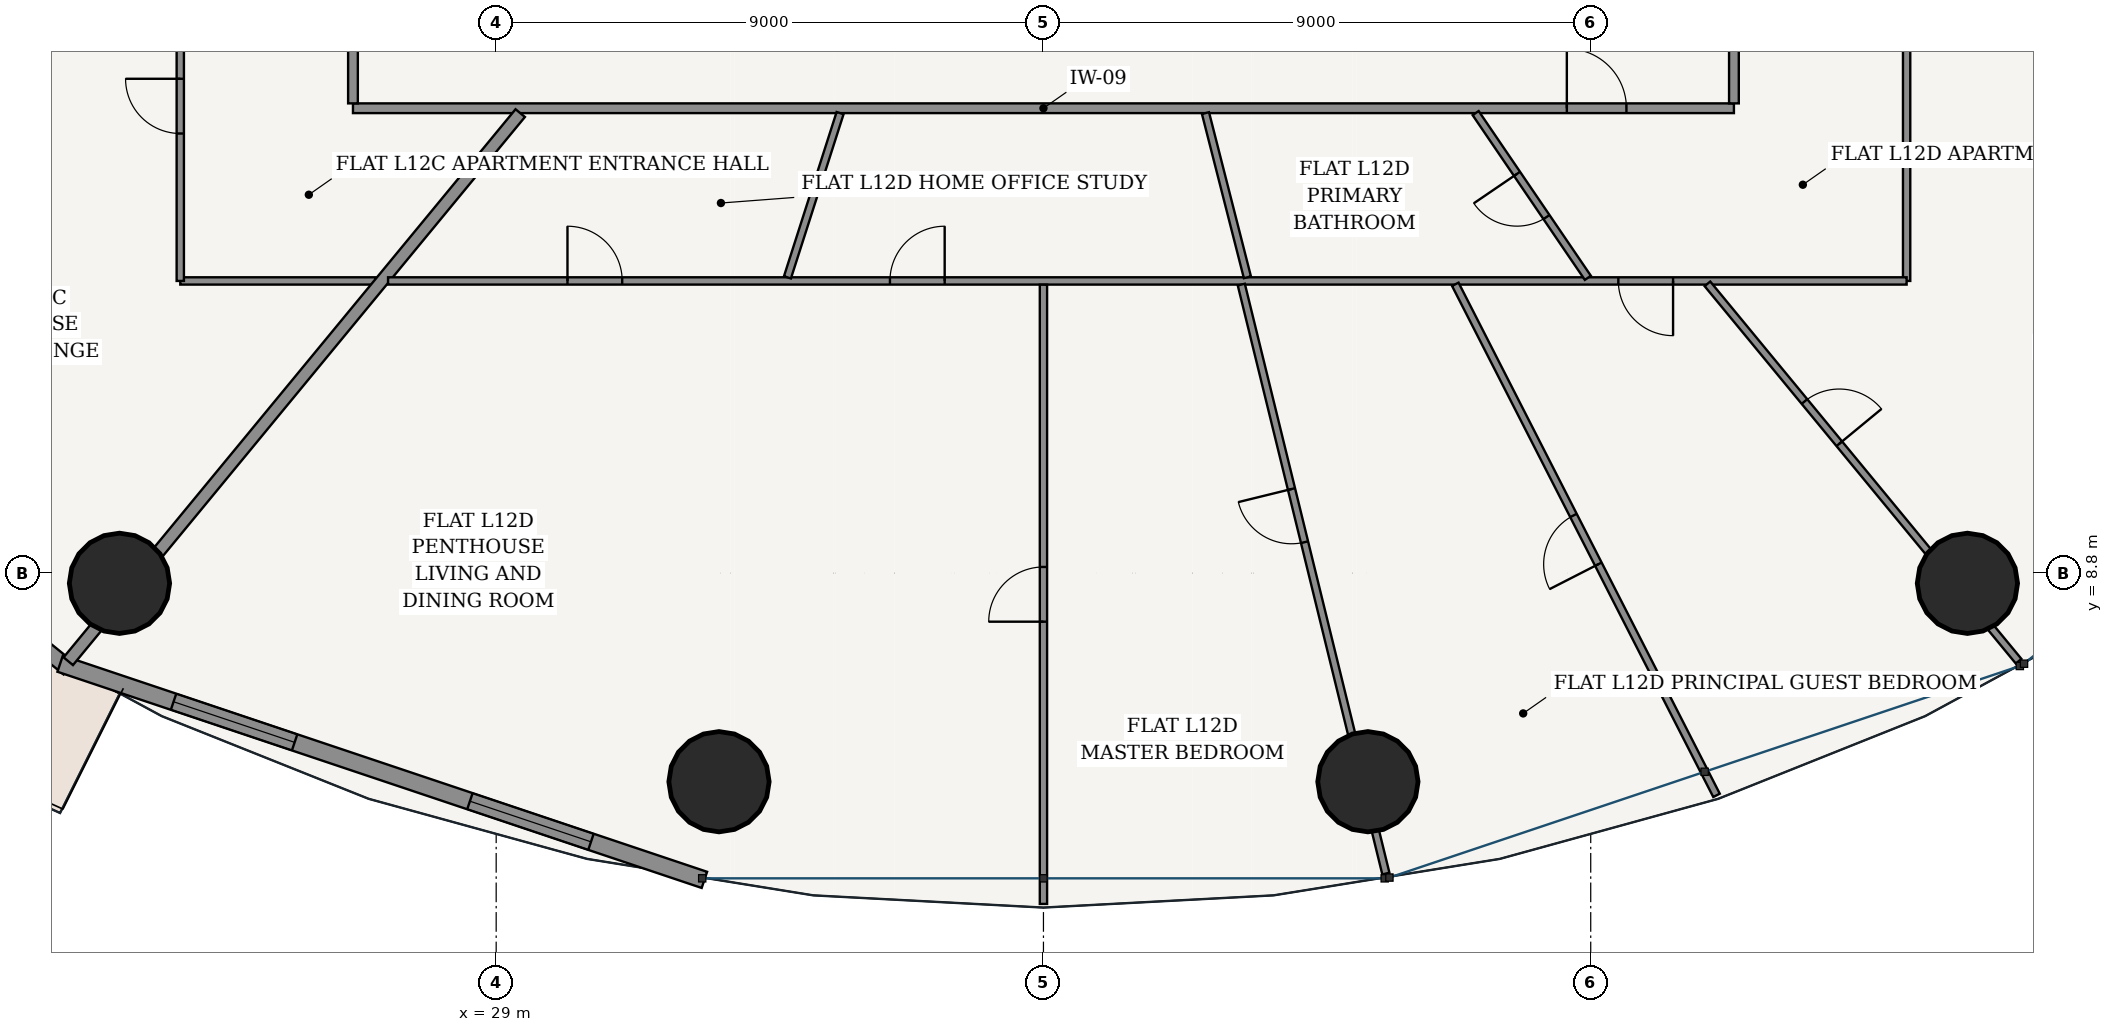
"""IFC4 building model, lengths in metres.
Left out: names, types, materials, properties, quantities, classifications, styles, units other than length and angle.
Written with IfcOpenShell. Run it as: python <this file> out.ifc"""

import sys

from ifc_helpers import new_model, si_unit, direction, frame, frame_2d, origin, origin_2d, place, context, subcontext, project, spatial, rectangle, hollow_circle, extrude, source, transform, mapped, element, fill, save


model = new_model("IFC4")
c1 = context("Model", 3, precision=1e-05, world=origin(), true_north=direction((-0.2419218956, 0.970295726276)))
c2 = subcontext(c1, "Body", "Model", "MODEL_VIEW")
j1 = project(units=[si_unit("LENGTHUNIT", "METRE"), si_unit("PLANEANGLEUNIT", "RADIAN")], contexts=[c1])
p1 = place(None, origin())
s1 = spatial("IfcSite", under=j1, at=p1, CompositionType="ELEMENT")
p2 = place(p1, origin())
s2 = spatial("IfcBuilding", under=s1, at=p2, CompositionType="ELEMENT")
p3 = place(p2, frame((0.0, 0.0, 49.2)))
s3 = spatial("IfcBuildingStorey", under=s2, at=p3, CompositionType="ELEMENT", Elevation=49.2)
for number, where, z_axis, x_axis in (
    (1, (22.805, 8.632, 0.0), (0.0, 0.0, 1.0), (1.0, 0.0, 0.0)),
    (2, (32.664, 5.37, 0.0), (0.0, 0.0, 1.0), (1.0, 0.0, 0.0)),
    (3, (43.336, 5.37, 0.0), (0.0, 0.0, 1.0), (1.0, 0.0, 0.0)),
    (4, (53.195, 8.632, 0.0), (0.0, 0.0, 1.0), (1.0, 0.0, 0.0)),
):
    element("IfcColumn", number, at=place(p3, frame(where, z_axis=z_axis, x_axis=x_axis)), inside=s3, PredefinedType="COLUMN", context=c2, shape_type="SweptSolid", body=[
        extrude(hollow_circle(Radius=0.825, WallThickness=0.05, at=origin_2d()), origin(), (0.0, 0.0, 1.0), 3.6),
    ])
p4 = place(p3, frame((13.85, 13.811, 0.0), z_axis=(0.0, 0.0, 1.0), x_axis=(0.777016782851, -0.629479879875, 0.0)))
e5 = element("IfcWall", 5, at=p4, inside=s3, PredefinedType="SOLIDWALL", context=c2, shape_type="SweptSolid", body=[
    extrude(rectangle(XDim=10.447, YDim=0.26, at=frame_2d((5.223, 0.0))), origin(), (0.0, 0.0, 1.0), 3.32),
])
p5 = place(p4, frame((4.548, 0.0, 0.0)))
e6 = element("IfcOpeningElement", 6, at=p5, cuts=e5, PredefinedType="OPENING", context=c2, shape_type="SweptSolid", body=[
    extrude(rectangle(XDim=1.35, YDim=2.2, at=frame_2d((0.675, 1.1))), frame((0.0, 0.14, 0.0), z_axis=(0.0, -1.0, 0.0), x_axis=(1.0, 0.0, 0.0)), (0.0, 0.0, 1.0), 0.28),
])
p6 = place(p3, frame((21.829, 7.311, 0.0), z_axis=(0.0, 0.0, 1.0), x_axis=(0.948047847546, -0.31812777113, 0.0)))
e7 = element("IfcWall", 7, at=p6, inside=s3, PredefinedType="SOLIDWALL", context=c2, shape_type="SweptSolid", body=[
    extrude(rectangle(XDim=11.175, YDim=0.28, at=frame_2d((5.588, 0.0))), origin(), (0.0, 0.0, 1.0), 3.32),
])
p7 = place(p6, frame((1.967, 0.0, 0.85)))
e8 = element("IfcOpeningElement", 8, at=p7, cuts=e7, PredefinedType="OPENING", context=c2, shape_type="SweptSolid", body=[
    extrude(rectangle(XDim=2.1, YDim=1.95, at=frame_2d((1.05, 0.975))), frame((0.0, 0.15, 0.0), z_axis=(0.0, -1.0, 0.0), x_axis=(1.0, 0.0, 0.0)), (0.0, 0.0, 1.0), 0.3),
])
p8 = place(p6, frame((7.108, 0.0, 0.85)))
e9 = element("IfcOpeningElement", 9, at=p8, cuts=e7, PredefinedType="OPENING", context=c2, shape_type="SweptSolid", body=[
    extrude(rectangle(XDim=2.1, YDim=1.95, at=frame_2d((1.05, 0.975))), frame((0.0, 0.15, 0.0), z_axis=(0.0, -1.0, 0.0), x_axis=(1.0, 0.0, 0.0)), (0.0, 0.0, 1.0), 0.3),
])
p9 = place(p3, frame((26.645, 16.445, 0.0), z_axis=(0.0, 0.0, 1.0), x_axis=(1.0, 0.0, 0.0)))
e10 = element("IfcWall", 10, at=p9, inside=s3, PredefinedType="PARTITIONING", context=c2, shape_type="SweptSolid", body=[
    extrude(rectangle(XDim=22.71, YDim=0.16, at=frame_2d((11.355, 0.0))), origin(), (0.0, 0.0, 1.0), 2.688),
])
p10 = place(p9, frame((19.962, 0.0, 0.0)))
e11 = element("IfcOpeningElement", 11, at=p10, cuts=e10, PredefinedType="OPENING", context=c2, shape_type="SweptSolid", body=[
    extrude(rectangle(XDim=0.98, YDim=2.2, at=frame_2d((0.49, 1.1))), frame((0.0, 0.09, 0.0), z_axis=(0.0, -1.0, 0.0), x_axis=(1.0, 0.0, 0.0)), (0.0, 0.0, 1.0), 0.18),
])
p11 = place(p3, frame((26.645, 16.525, 0.0), z_axis=(0.0, 0.0, 1.0), x_axis=(0.0, 1.0, 0.0)))
e12 = element("IfcWall", 12, at=p11, inside=s3, PredefinedType="PARTITIONING", context=c2, shape_type="SweptSolid", body=[
    extrude(rectangle(XDim=20.55, YDim=0.16, at=frame_2d((10.275, 0.0))), origin(), (0.0, 0.0, 1.0), 2.688),
])
p12 = place(p11, frame((2.224, 0.0, 0.0)))
e13 = element("IfcOpeningElement", 13, at=p12, cuts=e12, PredefinedType="OPENING", context=c2, shape_type="SweptSolid", body=[
    extrude(rectangle(XDim=0.98, YDim=2.2, at=frame_2d((0.49, 1.1))), frame((0.0, 0.09, 0.0), z_axis=(0.0, -1.0, 0.0), x_axis=(1.0, 0.0, 0.0)), (0.0, 0.0, 1.0), 0.18),
])
p13 = place(p3, frame((49.355, 16.525, 0.0), z_axis=(0.0, 0.0, 1.0), x_axis=(0.0, 1.0, 0.0)))
e14 = element("IfcWall", 14, at=p13, inside=s3, PredefinedType="PARTITIONING", context=c2, shape_type="SweptSolid", body=[
    extrude(rectangle(XDim=20.55, YDim=0.16, at=frame_2d((10.275, 0.0))), origin(), (0.0, 0.0, 1.0), 2.688),
])
p14 = place(p3, frame((49.435, 20.608, 0.0), z_axis=(0.0, 0.0, 1.0), x_axis=(0.879369737803, -0.476139542819, 0.0)))
e15 = element("IfcWall", 15, at=p14, inside=s3, PredefinedType="PARTITIONING", context=c2, shape_type="SweptSolid", body=[
    extrude(rectangle(XDim=14.295, YDim=0.2, at=frame_2d((7.147, 0.0))), origin(), (0.0, 0.0, 1.0), 2.688),
])
p15 = place(p3, frame((27.018, 13.605, 0.0), z_axis=(0.0, 0.0, 1.0), x_axis=(-1.0, 0.0, 0.0)))
e16 = element("IfcWall", 16, at=p15, inside=s3, PredefinedType="PARTITIONING", context=c2, shape_type="SweptSolid", body=[
    extrude(rectangle(XDim=3.213, YDim=0.12, at=frame_2d((1.606, 0.0))), origin(), (0.0, 0.0, 1.0), 2.688),
])
p16 = place(p3, frame((23.805, 13.605, 0.0), z_axis=(0.0, 0.0, 1.0), x_axis=(0.0, 1.0, 0.0)))
e17 = element("IfcWall", 17, at=p16, inside=s3, PredefinedType="PARTITIONING", context=c2, shape_type="SweptSolid", body=[
    extrude(rectangle(XDim=20.779, YDim=0.12, at=frame_2d((10.39, 0.0))), origin(), (0.0, 0.0, 1.0), 2.688),
])
p17 = place(p16, frame((2.425, 0.0, 0.0)))
e18 = element("IfcOpeningElement", 18, at=p17, cuts=e17, PredefinedType="OPENING", context=c2, shape_type="SweptSolid", body=[
    extrude(rectangle(XDim=0.9, YDim=2.15, at=frame_2d((0.45, 1.075))), frame((0.0, 0.07, 0.0), z_axis=(0.0, -1.0, 0.0), x_axis=(1.0, 0.0, 0.0)), (0.0, 0.0, 1.0), 0.14),
])
p18 = place(p16, frame((14.199, 0.0, 0.0)))
e19 = element("IfcOpeningElement", 19, at=p18, cuts=e17, PredefinedType="OPENING", context=c2, shape_type="SweptSolid", body=[
    extrude(rectangle(XDim=0.9, YDim=2.15, at=frame_2d((0.45, 1.075))), frame((0.0, 0.07, 0.0), z_axis=(0.0, -1.0, 0.0), x_axis=(1.0, 0.0, 0.0)), (0.0, 0.0, 1.0), 0.14),
])
p19 = place(p16, frame((17.908, 0.0, 0.0)))
e20 = element("IfcOpeningElement", 20, at=p19, cuts=e17, PredefinedType="OPENING", context=c2, shape_type="SweptSolid", body=[
    extrude(rectangle(XDim=0.9, YDim=2.15, at=frame_2d((0.45, 1.075))), frame((0.0, 0.07, 0.0), z_axis=(0.0, -1.0, 0.0), x_axis=(1.0, 0.0, 0.0)), (0.0, 0.0, 1.0), 0.14),
])
p20 = place(p3, frame((23.75, 19.084, 0.0), z_axis=(0.0, 0.0, 1.0), x_axis=(-0.879370672984, -0.476137815654, 0.0)))
e21 = element("IfcWall", 21, at=p20, inside=s3, PredefinedType="PARTITIONING", context=c2, shape_type="SweptSolid", body=[
    extrude(rectangle(XDim=11.094, YDim=0.12, at=frame_2d((5.547, 0.0))), origin(), (0.0, 0.0, 1.0), 2.688),
])
p21 = place(p20, frame((4.034, 0.0, 0.0)))
e22 = element("IfcOpeningElement", 22, at=p21, cuts=e21, PredefinedType="OPENING", context=c2, shape_type="SweptSolid", body=[
    extrude(rectangle(XDim=0.9, YDim=2.15, at=frame_2d((0.45, 1.075))), frame((0.0, 0.07, 0.0), z_axis=(0.0, -1.0, 0.0), x_axis=(1.0, 0.0, 0.0)), (0.0, 0.0, 1.0), 0.14),
])
p22 = place(p3, frame((29.396, 16.365, 0.0), z_axis=(0.0, 0.0, 1.0), x_axis=(-0.636186165667, -0.771535587393, 0.0)))
e23 = element("IfcWall", 23, at=p22, inside=s3, PredefinedType="PARTITIONING", context=c2, shape_type="SweptSolid", body=[
    extrude(rectangle(XDim=11.683, YDim=0.2, at=frame_2d((5.842, 0.0))), origin(), (0.0, 0.0, 1.0), 2.688),
])
p23 = place(p3, frame((52.195, 19.012, 0.0), z_axis=(0.0, 0.0, 1.0), x_axis=(0.0, -1.0, 0.0)))
e24 = element("IfcWall", 24, at=p23, inside=s3, PredefinedType="PARTITIONING", context=c2, shape_type="SweptSolid", body=[
    extrude(rectangle(XDim=5.407, YDim=0.12, at=frame_2d((2.704, 0.0))), origin(), (0.0, 0.0, 1.0), 2.999),
])
p24 = place(p3, frame((52.195, 13.605, 0.0), z_axis=(0.0, 0.0, 1.0), x_axis=(-1.0, 0.0, 0.0)))
e25 = element("IfcWall", 25, at=p24, inside=s3, PredefinedType="PARTITIONING", context=c2, shape_type="SweptSolid", body=[
    extrude(rectangle(XDim=24.973, YDim=0.12, at=frame_2d((12.487, 0.0))), origin(), (0.0, 0.0, 1.0), 2.688),
])
p25 = place(p24, frame((3.841, 0.0, 0.0)))
e26 = element("IfcOpeningElement", 26, at=p25, cuts=e25, PredefinedType="OPENING", context=c2, shape_type="SweptSolid", body=[
    extrude(rectangle(XDim=0.9, YDim=2.15, at=frame_2d((0.45, 1.075))), frame((0.0, 0.07, 0.0), z_axis=(0.0, -1.0, 0.0), x_axis=(1.0, 0.0, 0.0)), (0.0, 0.0, 1.0), 0.14),
])
p26 = place(p24, frame((15.819, 0.0, 0.0)))
e27 = element("IfcOpeningElement", 27, at=p26, cuts=e25, PredefinedType="OPENING", context=c2, shape_type="SweptSolid", body=[
    extrude(rectangle(XDim=0.9, YDim=2.15, at=frame_2d((0.45, 1.075))), frame((0.0, 0.07, 0.0), z_axis=(0.0, -1.0, 0.0), x_axis=(1.0, 0.0, 0.0)), (0.0, 0.0, 1.0), 0.14),
])
p27 = place(p24, frame((21.123, 0.0, 0.0)))
e28 = element("IfcOpeningElement", 28, at=p27, cuts=e25, PredefinedType="OPENING", context=c2, shape_type="SweptSolid", body=[
    extrude(rectangle(XDim=0.9, YDim=2.15, at=frame_2d((0.45, 1.075))), frame((0.0, 0.07, 0.0), z_axis=(0.0, -1.0, 0.0), x_axis=(1.0, 0.0, 0.0)), (0.0, 0.0, 1.0), 0.14),
])
p28 = place(p3, frame((38.0, 13.543, 0.0), z_axis=(0.0, 0.0, 1.0), x_axis=(0.0, -1.0, 0.0)))
e29 = element("IfcWall", 29, at=p28, inside=s3, PredefinedType="PARTITIONING", context=c2, shape_type="SweptSolid", body=[
    extrude(rectangle(XDim=10.183, YDim=0.12, at=frame_2d((5.091, 0.0))), origin(), (0.0, 0.0, 1.0), 2.762),
])
p29 = place(p28, frame((4.642, 0.0, 0.0)))
e30 = element("IfcOpeningElement", 30, at=p29, cuts=e29, PredefinedType="OPENING", context=c2, shape_type="SweptSolid", body=[
    extrude(rectangle(XDim=0.9, YDim=2.15, at=frame_2d((0.45, 1.075))), frame((0.0, 0.07, 0.0), z_axis=(0.0, -1.0, 0.0), x_axis=(1.0, 0.0, 0.0)), (0.0, 0.0, 1.0), 0.14),
])
p30 = place(p3, frame((41.254, 13.545, 0.0), z_axis=(0.0, 0.0, 1.0), x_axis=(0.238391877067, -0.971169044476, 0.0)))
e31 = element("IfcWall", 31, at=p30, inside=s3, PredefinedType="PARTITIONING", context=c2, shape_type="SweptSolid", body=[
    extrude(rectangle(XDim=9.973, YDim=0.12, at=frame_2d((4.986, 0.0))), origin(), (0.0, 0.0, 1.0), 2.688),
])
p31 = place(p30, frame((3.462, 0.0, 0.0)))
e32 = element("IfcOpeningElement", 32, at=p31, cuts=e31, PredefinedType="OPENING", context=c2, shape_type="SweptSolid", body=[
    extrude(rectangle(XDim=0.9, YDim=2.15, at=frame_2d((0.45, 1.075))), frame((0.0, 0.07, 0.0), z_axis=(0.0, -1.0, 0.0), x_axis=(1.0, 0.0, 0.0)), (0.0, 0.0, 1.0), 0.14),
])
p32 = place(p3, frame((44.773, 13.55, 0.0), z_axis=(0.0, 0.0, 1.0), x_axis=(0.455131567849, -0.890424200001, 0.0)))
e33 = element("IfcWall", 33, at=p32, inside=s3, PredefinedType="PARTITIONING", context=c2, shape_type="SweptSolid", body=[
    extrude(rectangle(XDim=9.439, YDim=0.12, at=frame_2d((4.719, 0.0))), origin(), (0.0, 0.0, 1.0), 2.762),
])
p33 = place(p32, frame((4.269, 0.0, 0.0)))
e34 = element("IfcOpeningElement", 34, at=p33, cuts=e33, PredefinedType="OPENING", context=c2, shape_type="SweptSolid", body=[
    extrude(rectangle(XDim=0.9, YDim=2.15, at=frame_2d((0.45, 1.075))), frame((0.0, 0.07, 0.0), z_axis=(0.0, -1.0, 0.0), x_axis=(1.0, 0.0, 0.0)), (0.0, 0.0, 1.0), 0.14),
])
p34 = place(p3, frame((48.919, 13.557, 0.0), z_axis=(0.0, 0.0, 1.0), x_axis=(0.636193310573, -0.771529695852, 0.0)))
e35 = element("IfcWall", 35, at=p34, inside=s3, PredefinedType="PARTITIONING", context=c2, shape_type="SweptSolid", body=[
    extrude(rectangle(XDim=8.044, YDim=0.12, at=frame_2d((4.022, 0.0))), origin(), (0.0, 0.0, 1.0), 2.688),
])
p35 = place(p34, frame((2.508, 0.0, 0.0)))
e36 = element("IfcOpeningElement", 36, at=p35, cuts=e35, PredefinedType="OPENING", context=c2, shape_type="SweptSolid", body=[
    extrude(rectangle(XDim=0.9, YDim=2.15, at=frame_2d((0.45, 1.075))), frame((0.0, 0.07, 0.0), z_axis=(0.0, -1.0, 0.0), x_axis=(1.0, 0.0, 0.0)), (0.0, 0.0, 1.0), 0.14),
])
p36 = place(p3, frame((34.656, 16.365, 0.0), z_axis=(0.0, 0.0, 1.0), x_axis=(-0.305153630579, -0.952303135427, 0.0)))
e37 = element("IfcWall", 37, at=p36, inside=s3, PredefinedType="PARTITIONING", context=c2, shape_type="SweptSolid", body=[
    extrude(rectangle(XDim=2.836, YDim=0.12, at=frame_2d((1.418, 0.0))), origin(), (0.0, 0.0, 1.0), 3.32),
])
p37 = place(p3, frame((40.665, 16.365, 0.0), z_axis=(0.0, 0.0, 1.0), x_axis=(0.2474182455, -0.968908773721, 0.0)))
e38 = element("IfcWall", 38, at=p37, inside=s3, PredefinedType="PARTITIONING", context=c2, shape_type="SweptSolid", body=[
    extrude(rectangle(XDim=2.787, YDim=0.12, at=frame_2d((1.393, 0.0))), origin(), (0.0, 0.0, 1.0), 2.688),
])
p38 = place(p3, frame((45.108, 16.365, 0.0), z_axis=(0.0, 0.0, 1.0), x_axis=(0.562992379509, -0.826462086617, 0.0)))
e39 = element("IfcWall", 39, at=p38, inside=s3, PredefinedType="PARTITIONING", context=c2, shape_type="SweptSolid", body=[
    extrude(rectangle(XDim=3.278, YDim=0.12, at=frame_2d((1.639, 0.0))), origin(), (0.0, 0.0, 1.0), 3.32),
])
p39 = place(p38, frame((1.209, 0.0, 0.0)))
e40 = element("IfcOpeningElement", 40, at=p39, cuts=e39, PredefinedType="OPENING", context=c2, shape_type="SweptSolid", body=[
    extrude(rectangle(XDim=0.86, YDim=2.15, at=frame_2d((0.43, 1.075))), frame((0.0, 0.07, 0.0), z_axis=(0.0, -1.0, 0.0), x_axis=(1.0, 0.0, 0.0)), (0.0, 0.0, 1.0), 0.14),
])
m1 = source(origin(), c2, "Body", "SweptSolid", [
    extrude(rectangle(XDim=2.1, YDim=1.95, at=frame_2d((1.05, 0.975))), frame((0.0, 0.03, 0.0), z_axis=(0.0, -1.0, 0.0), x_axis=(1.0, 0.0, 0.0)), (0.0, 0.0, 1.0), 0.06),
])
p40 = place(p7, origin())
e41 = element("IfcWindow", 41, at=p40, inside=s3, PartitioningType="SINGLE_PANEL", PredefinedType="WINDOW", context=c2, shape_type="MappedRepresentation", body=[
    mapped(m1, transform((0.0, 0.0, 0.0), scale=1.0)),
])
fill(e8, e41)
p41 = place(p8, origin())
e42 = element("IfcWindow", 42, at=p41, inside=s3, PartitioningType="SINGLE_PANEL", PredefinedType="WINDOW", context=c2, shape_type="MappedRepresentation", body=[
    mapped(m1, transform((0.0, 0.0, 0.0), scale=1.0)),
])
fill(e9, e42)
m2 = source(origin(), c2, "Body", "SweptSolid", [
    extrude(rectangle(XDim=0.9, YDim=2.15, at=frame_2d((0.45, 1.075))), frame((0.0, 0.025, 0.0), z_axis=(0.0, -1.0, 0.0), x_axis=(1.0, 0.0, 0.0)), (0.0, 0.0, 1.0), 0.05),
])
p42 = place(p17, origin())
e43 = element("IfcDoor", 43, at=p42, inside=s3, OperationType="SINGLE_SWING_RIGHT", PredefinedType="DOOR", context=c2, shape_type="MappedRepresentation", body=[
    mapped(m2, transform((0.0, 0.0, 0.0), scale=1.0)),
])
fill(e18, e43)
m3 = source(origin(), c2, "Body", "SweptSolid", [
    extrude(rectangle(XDim=0.98, YDim=2.2, at=frame_2d((0.49, 1.1))), frame((0.0, 0.025, 0.0), z_axis=(0.0, -1.0, 0.0), x_axis=(1.0, 0.0, 0.0)), (0.0, 0.0, 1.0), 0.05),
])
p43 = place(p10, origin())
e44 = element("IfcDoor", 44, at=p43, inside=s3, OperationType="SINGLE_SWING_LEFT", PredefinedType="DOOR", context=c2, shape_type="MappedRepresentation", body=[
    mapped(m3, transform((0.0, 0.0, 0.0), scale=1.0)),
])
fill(e11, e44)
m4 = source(origin(), c2, "Body", "SweptSolid", [
    extrude(rectangle(XDim=0.86, YDim=2.15, at=frame_2d((0.43, 1.075))), frame((0.0, 0.025, 0.0), z_axis=(0.0, -1.0, 0.0), x_axis=(1.0, 0.0, 0.0)), (0.0, 0.0, 1.0), 0.05),
])
p44 = place(p39, frame((0.86, 0.0, 0.0), z_axis=(0.0, 0.0, 1.0), x_axis=(-1.0, 0.0, 0.0)))
e45 = element("IfcDoor", 45, at=p44, inside=s3, OperationType="SINGLE_SWING_RIGHT", PredefinedType="DOOR", context=c2, shape_type="MappedRepresentation", body=[
    mapped(m4, transform((0.0, 0.0, 0.0), scale=1.0)),
])
fill(e40, e45)
p45 = place(p25, origin())
e46 = element("IfcDoor", 46, at=p45, inside=s3, OperationType="SINGLE_SWING_LEFT", PredefinedType="DOOR", context=c2, shape_type="MappedRepresentation", body=[
    mapped(m2, transform((0.0, 0.0, 0.0), scale=1.0)),
])
fill(e26, e46)
p46 = place(p35, origin())
e47 = element("IfcDoor", 47, at=p46, inside=s3, OperationType="SINGLE_SWING_RIGHT", PredefinedType="DOOR", context=c2, shape_type="MappedRepresentation", body=[
    mapped(m2, transform((0.0, 0.0, 0.0), scale=1.0)),
])
fill(e36, e47)
p47 = place(p33, frame((0.9, 0.0, 0.0), z_axis=(0.0, 0.0, 1.0), x_axis=(-1.0, 0.0, 0.0)))
e48 = element("IfcDoor", 48, at=p47, inside=s3, OperationType="SINGLE_SWING_LEFT", PredefinedType="DOOR", context=c2, shape_type="MappedRepresentation", body=[
    mapped(m2, transform((0.0, 0.0, 0.0), scale=1.0)),
])
fill(e34, e48)
p48 = place(p31, frame((0.9, 0.0, 0.0), z_axis=(0.0, 0.0, 1.0), x_axis=(-1.0, 0.0, 0.0)))
e49 = element("IfcDoor", 49, at=p48, inside=s3, OperationType="SINGLE_SWING_RIGHT", PredefinedType="DOOR", context=c2, shape_type="MappedRepresentation", body=[
    mapped(m2, transform((0.0, 0.0, 0.0), scale=1.0)),
])
fill(e32, e49)
p49 = place(p29, frame((0.9, 0.0, 0.0), z_axis=(0.0, 0.0, 1.0), x_axis=(-1.0, 0.0, 0.0)))
e50 = element("IfcDoor", 50, at=p49, inside=s3, OperationType="SINGLE_SWING_LEFT", PredefinedType="DOOR", context=c2, shape_type="MappedRepresentation", body=[
    mapped(m2, transform((0.0, 0.0, 0.0), scale=1.0)),
])
fill(e30, e50)
p50 = place(p26, frame((0.9, 0.0, 0.0), z_axis=(0.0, 0.0, 1.0), x_axis=(-1.0, 0.0, 0.0)))
e51 = element("IfcDoor", 51, at=p50, inside=s3, OperationType="SINGLE_SWING_RIGHT", PredefinedType="DOOR", context=c2, shape_type="MappedRepresentation", body=[
    mapped(m2, transform((0.0, 0.0, 0.0), scale=1.0)),
])
fill(e27, e51)
p51 = place(p27, frame((0.9, 0.0, 0.0), z_axis=(0.0, 0.0, 1.0), x_axis=(-1.0, 0.0, 0.0)))
e52 = element("IfcDoor", 52, at=p51, inside=s3, OperationType="SINGLE_SWING_LEFT", PredefinedType="DOOR", context=c2, shape_type="MappedRepresentation", body=[
    mapped(m2, transform((0.0, 0.0, 0.0), scale=1.0)),
])
fill(e28, e52)
save(model, sys.argv[1])
